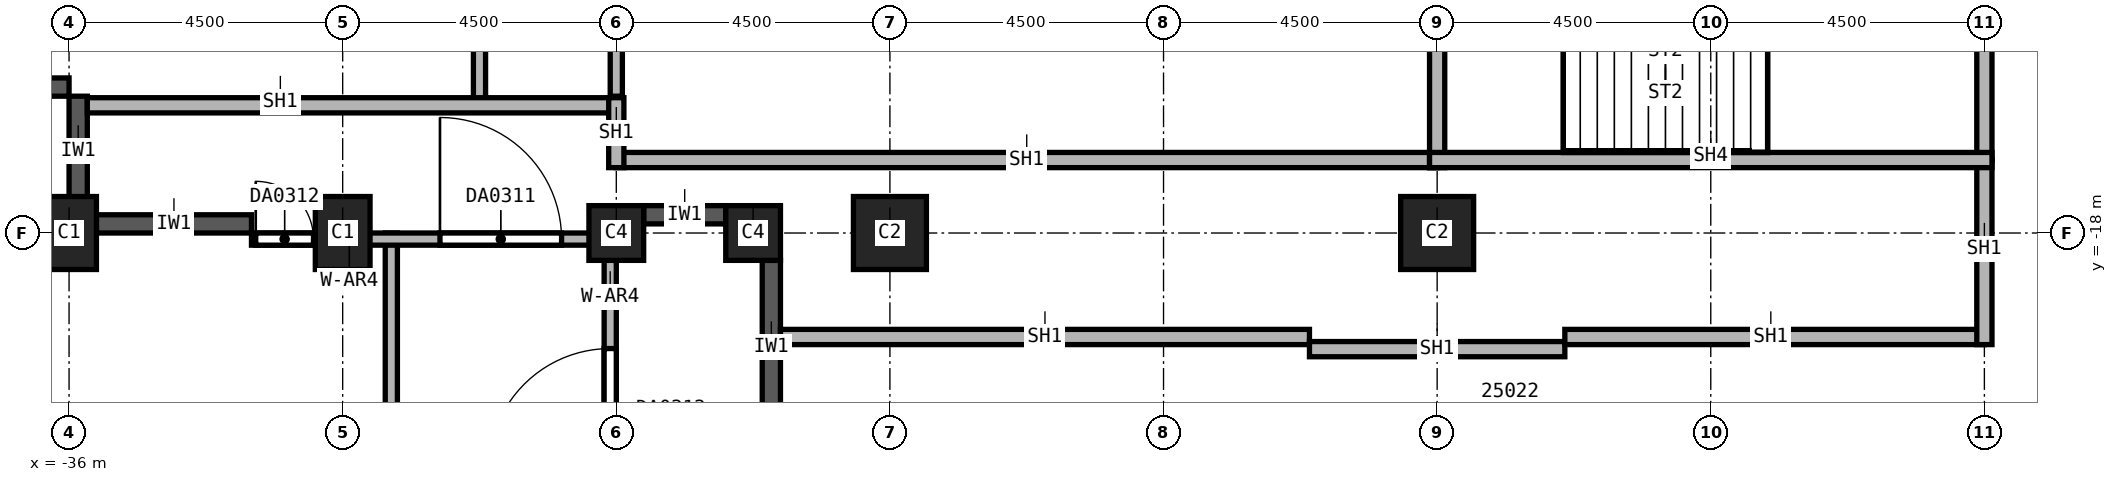
"""IFC4 building model, lengths in metres.
Left out: names, types, materials, properties, quantities, classifications, styles, units other than length and angle.
Written with IfcOpenShell. Run it as: python <this file> out.ifc"""

import sys

from ifc_helpers import new_model, si_unit, direction, frame, frame_2d, origin, origin_2d, place, context, subcontext, project, spatial, rectangle, extrude, element, fill, save


model = new_model("IFC4")
c1 = context("Model", 3, precision=1e-05, world=origin(), true_north=direction((0.0, 1.0)))
c2 = subcontext(c1, "Body", "Model", "MODEL_VIEW")
j1 = project(units=[si_unit("LENGTHUNIT", "METRE"), si_unit("PLANEANGLEUNIT", "RADIAN")], contexts=[c1])
p1 = place(None, origin())
s1 = spatial("IfcSite", under=j1, at=p1, CompositionType="ELEMENT")
p2 = place(p1, origin())
s2 = spatial("IfcBuilding", under=s1, at=p2, CompositionType="ELEMENT")
p3 = place(p2, frame((0.0, 0.0, 60.0)))
s3 = spatial("IfcBuildingStorey", under=s2, at=p3, CompositionType="ELEMENT", Elevation=60.0)
for number, where, z_axis, x_axis in (
    (1, (-31.5, -18.0, 0.0), (0.0, 0.0, 1.0), (1.0, 0.0, 0.0)),
    (2, (-36.0, -18.0, 0.0), (0.0, 0.0, 1.0), (1.0, 0.0, 0.0)),
):
    element("IfcColumn", number, at=place(p3, frame(where, z_axis=z_axis, x_axis=x_axis)), inside=s3, PredefinedType="COLUMN", context=c2, shape_type="SweptSolid", body=[
        extrude(rectangle(XDim=0.9, YDim=1.2, at=origin_2d()), origin(), (0.0, 0.0, 1.0), 7.7),
    ])
for number, where, z_axis, x_axis in (
    (3, (-13.5, -18.0, 0.0), (0.0, 0.0, 1.0), (1.0, 0.0, 0.0)),
    (4, (-22.5, -18.0, 0.0), (0.0, 0.0, 1.0), (1.0, 0.0, 0.0)),
):
    element("IfcColumn", number, at=place(p3, frame(where, z_axis=z_axis, x_axis=x_axis)), inside=s3, PredefinedType="COLUMN", context=c2, shape_type="SweptSolid", body=[
        extrude(rectangle(XDim=1.2, YDim=1.2, at=origin_2d()), origin(), (0.0, 0.0, 1.0), 7.7),
    ])
for number, where, z_axis, x_axis in (
    (5, (-27.0, -18.0, 0.0), (0.0, 0.0, 1.0), (1.0, 0.0, 0.0)),
    (6, (-24.75, -18.0, 0.0), (0.0, 0.0, 1.0), (1.0, 0.0, 0.0)),
):
    element("IfcColumn", number, at=place(p3, frame(where, z_axis=z_axis, x_axis=x_axis)), inside=s3, PredefinedType="COLUMN", context=c2, shape_type="SweptSolid", body=[
        extrude(rectangle(XDim=0.9, YDim=0.9, at=origin_2d()), origin(), (0.0, 0.0, 1.0), 7.7),
    ])
for number, where, z_axis, x_axis in (
    (7, (-37.8, -15.6, 0.0), (0.0, 0.0, 1.0), (1.0, 0.0, 0.0)),
    (8, (-35.85, -17.55, 0.0), (0.0, 0.0, 1.0), (0.0, 1.0, 0.0)),
):
    element("IfcWall", number, at=place(p3, frame(where, z_axis=z_axis, x_axis=x_axis)), inside=s3, PredefinedType="SOLIDWALL", context=c2, shape_type="SweptSolid", body=[
        extrude(rectangle(XDim=1.8, YDim=0.3, at=frame_2d((0.9, 0.0))), origin(), (0.0, 0.0, 1.0), 7.1),
    ])
p4 = place(p3, frame((-35.55, -17.85, 0.0), z_axis=(0.0, 0.0, 1.0), x_axis=(1.0, 0.0, 0.0)))
e9 = element("IfcWall", 9, at=p4, inside=s3, PredefinedType="SOLIDWALL", context=c2, shape_type="SweptSolid", body=[
    extrude(rectangle(XDim=2.55, YDim=0.3, at=frame_2d((1.275, 0.0))), origin(), (0.0, 0.0, 1.0), 7.1),
])
p5 = place(p3, frame((-26.55, -17.7, 0.0), z_axis=(0.0, 0.0, 1.0), x_axis=(1.0, 0.0, 0.0)))
e10 = element("IfcWall", 10, at=p5, inside=s3, PredefinedType="SOLIDWALL", context=c2, shape_type="SweptSolid", body=[
    extrude(rectangle(XDim=1.35, YDim=0.3, at=frame_2d((0.675, 0.0))), origin(), (0.0, 0.0, 1.0), 7.1),
])
p6 = place(p3, frame((-24.45, -18.45, 0.0), z_axis=(0.0, 0.0, 1.0), x_axis=(0.0, -1.0, 0.0)))
e11 = element("IfcWall", 11, at=p6, inside=s3, PredefinedType="SOLIDWALL", context=c2, shape_type="SweptSolid", body=[
    extrude(rectangle(XDim=2.85, YDim=0.3, at=frame_2d((1.425, 0.0))), origin(), (0.0, 0.0, 1.0), 7.1),
])
p7 = place(p3, frame((-29.25, 0.75, 0.0), z_axis=(0.0, 0.0, 1.0), x_axis=(0.0, -1.0, 0.0)))
e12 = element("IfcWall", 12, at=p7, inside=s3, PredefinedType="PARTITIONING", context=c2, shape_type="SweptSolid", body=[
    extrude(rectangle(XDim=16.65, YDim=0.2, at=frame_2d((8.325, 0.0))), origin(), (0.0, 0.0, 1.0), 7.7),
])
p8 = place(p3, frame((-27.0, -15.75, 0.0), z_axis=(0.0, 0.0, 1.0), x_axis=(0.0, 1.0, 0.0)))
e13 = element("IfcWall", 13, at=p8, inside=s3, PredefinedType="PARTITIONING", context=c2, shape_type="SweptSolid", body=[
    extrude(rectangle(XDim=16.5, YDim=0.2, at=frame_2d((8.25, 0.0))), origin(), (0.0, 0.0, 1.0), 7.7),
])
p9 = place(p3, frame((-35.7, -15.9, 0.0), z_axis=(0.0, 0.0, 1.0), x_axis=(1.0, 0.0, 0.0)))
e14 = element("IfcWall", 14, at=p9, inside=s3, PredefinedType="SOLIDWALL", context=c2, shape_type="SweptSolid", body=[
    extrude(rectangle(XDim=8.7, YDim=0.25, at=frame_2d((4.35, 0.0))), origin(), (0.0, 0.0, 1.0), 7.7),
])
p10 = place(p3, frame((-27.0, -16.8, 0.0), z_axis=(0.0, 0.0, 1.0), x_axis=(1.0, 0.0, 0.0)))
e15 = element("IfcWall", 15, at=p10, inside=s3, PredefinedType="SOLIDWALL", context=c2, shape_type="SweptSolid", body=[
    extrude(rectangle(XDim=13.5, YDim=0.25, at=frame_2d((6.75, 0.0))), origin(), (0.0, 0.0, 1.0), 7.7),
])
p11 = place(p3, frame((-27.0, -15.775, 0.0), z_axis=(0.0, 0.0, 1.0), x_axis=(0.0, -1.0, 0.0)))
e16 = element("IfcWall", 16, at=p11, inside=s3, PredefinedType="SOLIDWALL", context=c2, shape_type="SweptSolid", body=[
    extrude(rectangle(XDim=1.15, YDim=0.25, at=frame_2d((0.575, 0.0))), origin(), (0.0, 0.0, 1.0), 7.7),
])
p12 = place(p3, frame((-15.6, -19.71, 0.0), z_axis=(0.0, 0.0, 1.0), x_axis=(-1.0, 0.0, 0.0)))
e17 = element("IfcWall", 17, at=p12, inside=s3, PredefinedType="SOLIDWALL", context=c2, shape_type="SweptSolid", body=[
    extrude(rectangle(XDim=8.7, YDim=0.25, at=frame_2d((4.35, 0.0))), origin(), (0.0, 0.0, 1.0), 7.7),
])
p13 = place(p3, frame((-11.4, -19.91, 0.0), z_axis=(0.0, 0.0, 1.0), x_axis=(-1.0, 0.0, 0.0)))
e18 = element("IfcWall", 18, at=p13, inside=s3, PredefinedType="SOLIDWALL", context=c2, shape_type="SweptSolid", body=[
    extrude(rectangle(XDim=4.2, YDim=0.25, at=frame_2d((2.1, 0.0))), origin(), (0.0, 0.0, 1.0), 7.7),
])
p14 = place(p3, frame((-4.5, -19.71, 0.0), z_axis=(0.0, 0.0, 1.0), x_axis=(-1.0, 0.0, 0.0)))
e19 = element("IfcWall", 19, at=p14, inside=s3, PredefinedType="SOLIDWALL", context=c2, shape_type="SweptSolid", body=[
    extrude(rectangle(XDim=6.9, YDim=0.25, at=frame_2d((3.45, 0.0))), origin(), (0.0, 0.0, 1.0), 7.7),
])
p15 = place(p3, frame((-4.5, -16.8, 0.0), z_axis=(0.0, 0.0, 1.0), x_axis=(0.0, -1.0, 0.0)))
e20 = element("IfcWall", 20, at=p15, inside=s3, PredefinedType="SOLIDWALL", context=c2, shape_type="SweptSolid", body=[
    extrude(rectangle(XDim=3.035, YDim=0.25, at=frame_2d((1.518, 0.0))), origin(), (0.0, 0.0, 1.0), 7.7),
])
p16 = place(p3, frame((-13.5, -16.925, 0.0), z_axis=(0.0, 0.0, 1.0), x_axis=(0.0, 1.0, 0.0)))
e21 = element("IfcWall", 21, at=p16, inside=s3, PredefinedType="SOLIDWALL", context=c2, shape_type="SweptSolid", body=[
    extrude(rectangle(XDim=4.625, YDim=0.25, at=frame_2d((2.312, 0.0))), origin(), (0.0, 0.0, 1.0), 7.7),
])
p17 = place(p3, frame((-4.5, -12.3, 0.0), z_axis=(0.0, 0.0, 1.0), x_axis=(0.0, -1.0, 0.0)))
e22 = element("IfcWall", 22, at=p17, inside=s3, PredefinedType="SOLIDWALL", context=c2, shape_type="SweptSolid", body=[
    extrude(rectangle(XDim=4.5, YDim=0.25, at=frame_2d((2.25, 0.0))), origin(), (0.0, 0.0, 1.0), 7.7),
])
p18 = place(p3, frame((-4.375, -16.8, 0.0), z_axis=(0.0, 0.0, 1.0), x_axis=(-1.0, 0.0, 0.0)))
e23 = element("IfcWall", 23, at=p18, inside=s3, PredefinedType="SOLIDWALL", context=c2, shape_type="SweptSolid", body=[
    extrude(rectangle(XDim=9.25, YDim=0.25, at=frame_2d((4.625, 0.0))), origin(), (0.0, 0.0, 1.0), 7.7),
])
p19 = place(p3, frame((-27.1, -35.9, 0.0), z_axis=(0.0, 0.0, 1.0), x_axis=(0.0, 1.0, 0.0)))
e24 = element("IfcWall", 24, at=p19, inside=s3, PredefinedType="SOLIDWALL", context=c2, shape_type="SweptSolid", body=[
    extrude(rectangle(XDim=17.8, YDim=0.2, at=frame_2d((8.9, 0.0))), origin(), (0.0, 0.0, 1.0), 8.0),
])
p20 = place(p19, frame((14.0, 0.0, 0.0)))
e25 = element("IfcOpeningElement", 25, at=p20, cuts=e24, PredefinedType="OPENING", context=c2, shape_type="SweptSolid", body=[
    extrude(rectangle(XDim=2.0, YDim=2.4, at=frame_2d((1.0, 1.2))), frame((0.0, 0.1, 0.0), z_axis=(0.0, -1.0, 0.0), x_axis=(1.0, 0.0, 0.0)), (0.0, 0.0, 1.0), 0.2),
])
p21 = place(p19, frame((11.4, 0.0, 0.0)))
e26 = element("IfcOpeningElement", 26, at=p21, cuts=e24, PredefinedType="OPENING", context=c2, shape_type="SweptSolid", body=[
    extrude(rectangle(XDim=2.0, YDim=2.4, at=frame_2d((1.0, 1.2))), frame((0.0, 0.1, 0.0), z_axis=(0.0, -1.0, 0.0), x_axis=(1.0, 0.0, 0.0)), (0.0, 0.0, 1.0), 0.2),
])
p22 = place(p3, frame((-30.7, -32.8, 0.0), z_axis=(0.0, 0.0, 1.0), x_axis=(0.0, 1.0, 0.0)))
e27 = element("IfcWall", 27, at=p22, inside=s3, PredefinedType="SOLIDWALL", context=c2, shape_type="SweptSolid", body=[
    extrude(rectangle(XDim=14.8, YDim=0.2, at=frame_2d((7.4, 0.0))), origin(), (0.0, 0.0, 1.0), 8.0),
])
p23 = place(p3, frame((-33.0, -18.1, 0.0), z_axis=(0.0, 0.0, 1.0), x_axis=(1.0, 0.0, 0.0)))
e28 = element("IfcWall", 28, at=p23, inside=s3, PredefinedType="SOLIDWALL", context=c2, shape_type="SweptSolid", body=[
    extrude(rectangle(XDim=6.0, YDim=0.2, at=frame_2d((3.0, 0.0))), origin(), (0.0, 0.0, 1.0), 8.0),
])
p24 = place(p23, frame((3.1, 0.0, 0.0)))
e29 = element("IfcOpeningElement", 29, at=p24, cuts=e28, PredefinedType="OPENING", context=c2, shape_type="SweptSolid", body=[
    extrude(rectangle(XDim=2.0, YDim=2.4, at=frame_2d((1.0, 1.2))), frame((0.0, 0.1, 0.0), z_axis=(0.0, -1.0, 0.0), x_axis=(1.0, 0.0, 0.0)), (0.0, 0.0, 1.0), 0.2),
])
p25 = place(p23, frame((0.07, 0.0, 0.0)))
e30 = element("IfcOpeningElement", 30, at=p25, cuts=e28, PredefinedType="OPENING", context=c2, shape_type="SweptSolid", body=[
    extrude(rectangle(XDim=0.95, YDim=2.4, at=frame_2d((0.475, 1.2))), frame((0.0, 0.1, 0.0), z_axis=(0.0, -1.0, 0.0), x_axis=(1.0, 0.0, 0.0)), (0.0, 0.0, 1.0), 0.2),
])
p26 = place(p24, origin())
e31 = element("IfcDoor", 31, at=p26, inside=s3, OperationType="DOUBLE_DOOR_SINGLE_SWING", PredefinedType="DOOR", context=c2, shape_type="SweptSolid", body=[
    extrude(rectangle(XDim=2.0, YDim=2.4, at=frame_2d((1.0, 1.2))), frame((0.0, 0.025, 0.0), z_axis=(0.0, -1.0, 0.0), x_axis=(1.0, 0.0, 0.0)), (0.0, 0.0, 1.0), 0.05),
])
fill(e29, e31)
p27 = place(p25, origin())
e32 = element("IfcDoor", 32, at=p27, inside=s3, OperationType="SINGLE_SWING_LEFT", PredefinedType="DOOR", context=c2, shape_type="SweptSolid", body=[
    extrude(rectangle(XDim=0.95, YDim=2.4, at=frame_2d((0.475, 1.2))), frame((0.0, 0.025, 0.0), z_axis=(0.0, -1.0, 0.0), x_axis=(1.0, 0.0, 0.0)), (0.0, 0.0, 1.0), 0.05),
])
fill(e30, e32)
p28 = place(p20, frame((2.0, 0.0, 0.0), z_axis=(0.0, 0.0, 1.0), x_axis=(-1.0, 0.0, 0.0)))
e33 = element("IfcDoor", 33, at=p28, inside=s3, OperationType="DOUBLE_DOOR_SINGLE_SWING", PredefinedType="DOOR", context=c2, shape_type="SweptSolid", body=[
    extrude(rectangle(XDim=2.0, YDim=2.4, at=frame_2d((1.0, 1.2))), frame((0.0, 0.025, 0.0), z_axis=(0.0, -1.0, 0.0), x_axis=(1.0, 0.0, 0.0)), (0.0, 0.0, 1.0), 0.05),
])
fill(e25, e33)
save(model, sys.argv[1])
